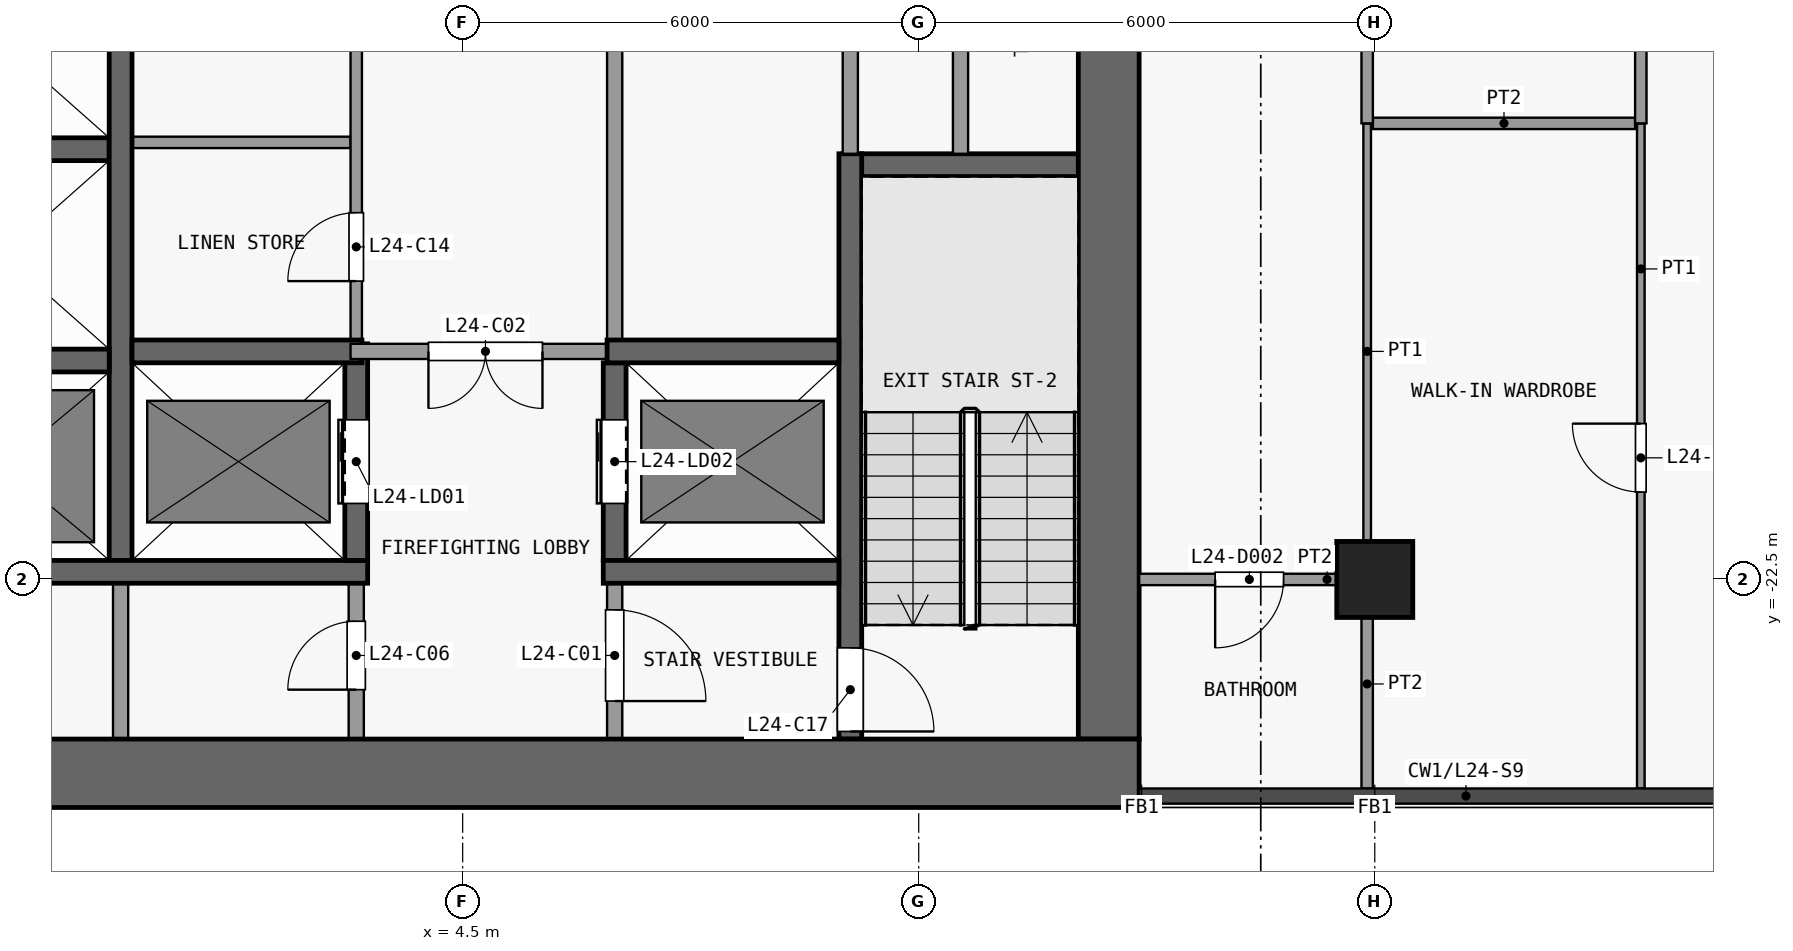
"""IFC4 building model, lengths in metres.
Left out: names, types, materials, properties, quantities, classifications, styles, units other than length and angle.
Written with IfcOpenShell. Run it as: python <this file> out.ifc"""

import sys

from ifc_helpers import new_model, si_unit, direction, frame, frame_2d, origin, origin_2d, place, context, subcontext, project, spatial, rectangle, extrude, element, fill, save


model = new_model("IFC4")
c1 = context("Model", 3, precision=1e-05, world=origin(), true_north=direction((0.0, 1.0)))
c2 = subcontext(c1, "Body", "Model", "MODEL_VIEW")
j1 = project(units=[si_unit("LENGTHUNIT", "METRE"), si_unit("PLANEANGLEUNIT", "RADIAN")], contexts=[c1])
p1 = place(None, origin())
s1 = spatial("IfcSite", under=j1, at=p1, CompositionType="ELEMENT")
p2 = place(p1, origin())
s2 = spatial("IfcBuilding", under=s1, at=p2, CompositionType="ELEMENT")
p3 = place(p2, frame((0.0, 0.0, 99.1)))
s3 = spatial("IfcBuildingStorey", under=s2, at=p3, CompositionType="ELEMENT", Elevation=99.1)
p4 = place(p3, frame((16.5, -22.5, 0.0), z_axis=(0.0, 0.0, 1.0), x_axis=(1.0, 0.0, 0.0)))
e1 = element("IfcColumn", 1, at=p4, inside=s3, PredefinedType="COLUMN", context=c2, shape_type="SweptSolid", body=[
    extrude(rectangle(XDim=1.0, YDim=1.0, at=origin_2d()), origin(), (0.0, 0.0, 1.0), 3.6),
])
p5 = place(p3, frame((-13.4, -25.05, 0.0), z_axis=(0.0, 0.0, 1.0), x_axis=(1.0, 0.0, 0.0)))
e2 = element("IfcWall", 2, at=p5, inside=s3, PredefinedType="SHEAR", context=c2, shape_type="SweptSolid", body=[
    extrude(rectangle(XDim=26.8, YDim=0.9, at=frame_2d((13.4, 0.0))), origin(), (0.0, 0.0, 1.0), 3.3),
])
p6 = place(p3, frame((13.0, -24.6, 0.0), z_axis=(0.0, 0.0, 1.0), x_axis=(0.0, 1.0, 0.0)))
e3 = element("IfcWall", 3, at=p6, inside=s3, PredefinedType="SHEAR", context=c2, shape_type="SweptSolid", body=[
    extrude(rectangle(XDim=16.1, YDim=0.8, at=frame_2d((8.05, 0.0))), origin(), (0.0, 0.0, 1.0), 3.3),
])
p7 = place(p3, frame((-2.95, -22.4, 0.0), z_axis=(0.0, 0.0, 1.0), x_axis=(1.0, 0.0, 0.0)))
e4 = element("IfcWall", 4, at=p7, inside=s3, PredefinedType="SHEAR", context=c2, shape_type="SweptSolid", body=[
    extrude(rectangle(XDim=6.2, YDim=0.3, at=frame_2d((3.1, 0.0))), origin(), (0.0, 0.0, 1.0), 3.3),
])
p8 = place(p3, frame((6.35, -22.4, 0.0), z_axis=(0.0, 0.0, 1.0), x_axis=(1.0, 0.0, 0.0)))
e5 = element("IfcWall", 5, at=p8, inside=s3, PredefinedType="SHEAR", context=c2, shape_type="SweptSolid", body=[
    extrude(rectangle(XDim=3.1, YDim=0.3, at=frame_2d((1.55, 0.0))), origin(), (0.0, 0.0, 1.0), 3.3),
])
p9 = place(p3, frame((-2.95, -19.62, 0.0), z_axis=(0.0, 0.0, 1.0), x_axis=(1.0, 0.0, 0.0)))
e6 = element("IfcWall", 6, at=p9, inside=s3, PredefinedType="SHEAR", context=c2, shape_type="SweptSolid", body=[
    extrude(rectangle(XDim=2.8, YDim=0.3, at=frame_2d((1.4, 0.0))), origin(), (0.0, 0.0, 1.0), 3.3),
])
p10 = place(p3, frame((0.15, -19.5, 0.0), z_axis=(0.0, 0.0, 1.0), x_axis=(1.0, 0.0, 0.0)))
e7 = element("IfcWall", 7, at=p10, inside=s3, PredefinedType="SHEAR", context=c2, shape_type="SweptSolid", body=[
    extrude(rectangle(XDim=3.025, YDim=0.3, at=frame_2d((1.513, 0.0))), origin(), (0.0, 0.0, 1.0), 3.3),
])
p11 = place(p3, frame((6.4, -19.5, 0.0), z_axis=(0.0, 0.0, 1.0), x_axis=(-1.0, 0.0, 0.0)))
e8 = element("IfcWall", 8, at=p11, inside=s3, PredefinedType="PARTITIONING", context=c2, shape_type="SweptSolid", body=[
    extrude(rectangle(XDim=3.375, YDim=0.2, at=frame_2d((1.688, 0.0))), origin(), (0.0, 0.0, 1.0), 3.3),
])
p12 = place(p11, frame((0.85, 0.0, 0.0)))
e9 = element("IfcOpeningElement", 9, at=p12, cuts=e8, PredefinedType="OPENING", context=c2, shape_type="SweptSolid", body=[
    extrude(rectangle(XDim=1.5, YDim=2.1, at=frame_2d((0.75, 1.05))), frame((0.0, 0.11, 0.0), z_axis=(0.0, -1.0, 0.0), x_axis=(1.0, 0.0, 0.0)), (0.0, 0.0, 1.0), 0.22),
])
p13 = place(p3, frame((6.4, -19.5, 0.0), z_axis=(0.0, 0.0, 1.0), x_axis=(1.0, 0.0, 0.0)))
e10 = element("IfcWall", 10, at=p13, inside=s3, PredefinedType="SHEAR", context=c2, shape_type="SweptSolid", body=[
    extrude(rectangle(XDim=3.05, YDim=0.3, at=frame_2d((1.525, 0.0))), origin(), (0.0, 0.0, 1.0), 3.3),
])
p14 = place(p3, frame((9.5, -17.05, 0.0), z_axis=(0.0, 0.0, 1.0), x_axis=(1.0, 0.0, 0.0)))
e11 = element("IfcWall", 11, at=p14, inside=s3, PredefinedType="SHEAR", context=c2, shape_type="SweptSolid", body=[
    extrude(rectangle(XDim=3.1, YDim=0.3, at=frame_2d((1.55, 0.0))), origin(), (0.0, 0.0, 1.0), 3.3),
])
p15 = place(p3, frame((-2.95, -16.84, 0.0), z_axis=(0.0, 0.0, 1.0), x_axis=(1.0, 0.0, 0.0)))
e12 = element("IfcWall", 12, at=p15, inside=s3, PredefinedType="SHEAR", context=c2, shape_type="SweptSolid", body=[
    extrude(rectangle(XDim=2.8, YDim=0.3, at=frame_2d((1.4, 0.0))), origin(), (0.0, 0.0, 1.0), 3.3),
])
p16 = place(p3, frame((0.15, -16.75, 0.0), z_axis=(0.0, 0.0, 1.0), x_axis=(1.0, 0.0, 0.0)))
e13 = element("IfcWall", 13, at=p16, inside=s3, PredefinedType="PARTITIONING", context=c2, shape_type="SweptSolid", body=[
    extrude(rectangle(XDim=2.875, YDim=0.15, at=frame_2d((1.438, 0.0))), origin(), (0.0, 0.0, 1.0), 3.3),
])
p17 = place(p3, frame((0.0, -24.6, 0.0), z_axis=(0.0, 0.0, 1.0), x_axis=(0.0, 1.0, 0.0)))
e14 = element("IfcWall", 14, at=p17, inside=s3, PredefinedType="PARTITIONING", context=c2, shape_type="SweptSolid", body=[
    extrude(rectangle(XDim=2.05, YDim=0.2, at=frame_2d((1.025, 0.0))), origin(), (0.0, 0.0, 1.0), 3.3),
])
p18 = place(p3, frame((0.0, -22.25, 0.0), z_axis=(0.0, 0.0, 1.0), x_axis=(0.0, 1.0, 0.0)))
e15 = element("IfcWall", 15, at=p18, inside=s3, PredefinedType="SHEAR", context=c2, shape_type="SweptSolid", body=[
    extrude(rectangle(XDim=13.75, YDim=0.3, at=frame_2d((6.875, 0.0))), origin(), (0.0, 0.0, 1.0), 3.3),
])
p19 = place(p3, frame((3.1, -24.6, 0.0), z_axis=(0.0, 0.0, 1.0), x_axis=(0.0, 1.0, 0.0)))
e16 = element("IfcWall", 16, at=p19, inside=s3, PredefinedType="PARTITIONING", context=c2, shape_type="SweptSolid", body=[
    extrude(rectangle(XDim=2.05, YDim=0.2, at=frame_2d((1.025, 0.0))), origin(), (0.0, 0.0, 1.0), 3.3),
])
p20 = place(p19, frame((0.65, 0.0, 0.0)))
e17 = element("IfcOpeningElement", 17, at=p20, cuts=e16, PredefinedType="OPENING", context=c2, shape_type="SweptSolid", body=[
    extrude(rectangle(XDim=0.9, YDim=2.1, at=frame_2d((0.45, 1.05))), frame((0.0, 0.11, 0.0), z_axis=(0.0, -1.0, 0.0), x_axis=(1.0, 0.0, 0.0)), (0.0, 0.0, 1.0), 0.22),
])
p21 = place(p3, frame((3.1, -22.25, 0.0), z_axis=(0.0, 0.0, 1.0), x_axis=(0.0, 1.0, 0.0)))
e18 = element("IfcWall", 18, at=p21, inside=s3, PredefinedType="SHEAR", context=c2, shape_type="SweptSolid", body=[
    extrude(rectangle(XDim=2.85, YDim=0.3, at=frame_2d((1.425, 0.0))), origin(), (0.0, 0.0, 1.0), 3.3),
])
p22 = place(p21, frame((0.75, 0.0, 0.0)))
e19 = element("IfcOpeningElement", 19, at=p22, cuts=e18, PredefinedType="OPENING", context=c2, shape_type="SweptSolid", body=[
    extrude(rectangle(XDim=1.1, YDim=2.1, at=frame_2d((0.55, 1.05))), frame((0.0, 0.16, 0.0), z_axis=(0.0, -1.0, 0.0), x_axis=(1.0, 0.0, 0.0)), (0.0, 0.0, 1.0), 0.32),
])
p23 = place(p3, frame((3.1, -19.4, 0.0), z_axis=(0.0, 0.0, 1.0), x_axis=(0.0, 1.0, 0.0)))
e20 = element("IfcWall", 20, at=p23, inside=s3, PredefinedType="PARTITIONING", context=c2, shape_type="SweptSolid", body=[
    extrude(rectangle(XDim=10.9, YDim=0.15, at=frame_2d((5.45, 0.0))), origin(), (0.0, 0.0, 1.0), 3.3),
])
p24 = place(p23, frame((0.825, 0.0, 0.0)))
e21 = element("IfcOpeningElement", 21, at=p24, cuts=e20, PredefinedType="OPENING", context=c2, shape_type="SweptSolid", body=[
    extrude(rectangle(XDim=0.9, YDim=2.1, at=frame_2d((0.45, 1.05))), frame((0.0, 0.085, 0.0), z_axis=(0.0, -1.0, 0.0), x_axis=(1.0, 0.0, 0.0)), (0.0, 0.0, 1.0), 0.17),
])
p25 = place(p23, frame((6.175, 0.0, 0.0)))
e22 = element("IfcOpeningElement", 22, at=p25, cuts=e20, PredefinedType="OPENING", context=c2, shape_type="SweptSolid", body=[
    extrude(rectangle(XDim=1.2, YDim=2.1, at=frame_2d((0.6, 1.05))), frame((0.0, 0.085, 0.0), z_axis=(0.0, -1.0, 0.0), x_axis=(1.0, 0.0, 0.0)), (0.0, 0.0, 1.0), 0.17),
])
p26 = place(p3, frame((6.5, -22.55, 0.0), z_axis=(0.0, 0.0, 1.0), x_axis=(0.0, -1.0, 0.0)))
e23 = element("IfcWall", 23, at=p26, inside=s3, PredefinedType="PARTITIONING", context=c2, shape_type="SweptSolid", body=[
    extrude(rectangle(XDim=2.05, YDim=0.2, at=frame_2d((1.025, 0.0))), origin(), (0.0, 0.0, 1.0), 3.3),
])
p27 = place(p26, frame((0.35, 0.0, 0.0)))
e24 = element("IfcOpeningElement", 24, at=p27, cuts=e23, PredefinedType="OPENING", context=c2, shape_type="SweptSolid", body=[
    extrude(rectangle(XDim=1.2, YDim=2.1, at=frame_2d((0.6, 1.05))), frame((0.0, 0.11, 0.0), z_axis=(0.0, -1.0, 0.0), x_axis=(1.0, 0.0, 0.0)), (0.0, 0.0, 1.0), 0.22),
])
p28 = place(p3, frame((6.5, -22.25, 0.0), z_axis=(0.0, 0.0, 1.0), x_axis=(0.0, 1.0, 0.0)))
e25 = element("IfcWall", 25, at=p28, inside=s3, PredefinedType="SHEAR", context=c2, shape_type="SweptSolid", body=[
    extrude(rectangle(XDim=2.6, YDim=0.3, at=frame_2d((1.3, 0.0))), origin(), (0.0, 0.0, 1.0), 3.3),
])
p29 = place(p28, frame((0.75, 0.0, 0.0)))
e26 = element("IfcOpeningElement", 26, at=p29, cuts=e25, PredefinedType="OPENING", context=c2, shape_type="SweptSolid", body=[
    extrude(rectangle(XDim=1.1, YDim=2.1, at=frame_2d((0.55, 1.05))), frame((0.0, 0.16, 0.0), z_axis=(0.0, -1.0, 0.0), x_axis=(1.0, 0.0, 0.0)), (0.0, 0.0, 1.0), 0.32),
])
p30 = place(p3, frame((6.5, -8.5, 0.0), z_axis=(0.0, 0.0, 1.0), x_axis=(0.0, -1.0, 0.0)))
e27 = element("IfcWall", 27, at=p30, inside=s3, PredefinedType="PARTITIONING", context=c2, shape_type="SweptSolid", body=[
    extrude(rectangle(XDim=10.85, YDim=0.2, at=frame_2d((5.425, 0.0))), origin(), (0.0, 0.0, 1.0), 3.3),
])
p31 = place(p30, frame((4.9, 0.0, 0.0)))
e28 = element("IfcOpeningElement", 28, at=p31, cuts=e27, PredefinedType="OPENING", context=c2, shape_type="SweptSolid", body=[
    extrude(rectangle(XDim=1.2, YDim=2.1, at=frame_2d((0.6, 1.05))), frame((0.0, 0.11, 0.0), z_axis=(0.0, -1.0, 0.0), x_axis=(1.0, 0.0, 0.0)), (0.0, 0.0, 1.0), 0.22),
])
p32 = place(p3, frame((9.6, -16.9, 0.0), z_axis=(0.0, 0.0, 1.0), x_axis=(0.0, -1.0, 0.0)))
e29 = element("IfcWall", 29, at=p32, inside=s3, PredefinedType="SHEAR", context=c2, shape_type="SweptSolid", body=[
    extrude(rectangle(XDim=7.7, YDim=0.3, at=frame_2d((3.85, 0.0))), origin(), (0.0, 0.0, 1.0), 3.3),
])
p33 = place(p32, frame((6.5, 0.0, 0.0)))
e30 = element("IfcOpeningElement", 30, at=p33, cuts=e29, PredefinedType="OPENING", context=c2, shape_type="SweptSolid", body=[
    extrude(rectangle(XDim=1.1, YDim=2.1, at=frame_2d((0.55, 1.05))), frame((0.0, 0.16, 0.0), z_axis=(0.0, -1.0, 0.0), x_axis=(1.0, 0.0, 0.0)), (0.0, 0.0, 1.0), 0.32),
])
p34 = place(p3, frame((9.6, -16.9, 0.0), z_axis=(0.0, 0.0, 1.0), x_axis=(0.0, 1.0, 0.0)))
e31 = element("IfcWall", 31, at=p34, inside=s3, PredefinedType="PARTITIONING", context=c2, shape_type="SweptSolid", body=[
    extrude(rectangle(XDim=8.4, YDim=0.2, at=frame_2d((4.2, 0.0))), origin(), (0.0, 0.0, 1.0), 3.3),
])
p35 = place(p3, frame((11.05, -10.5, 0.0), z_axis=(0.0, 0.0, 1.0), x_axis=(0.0, -1.0, 0.0)))
e32 = element("IfcWall", 32, at=p35, inside=s3, PredefinedType="PARTITIONING", context=c2, shape_type="SweptSolid", body=[
    extrude(rectangle(XDim=6.4, YDim=0.2, at=frame_2d((3.2, 0.0))), origin(), (0.0, 0.0, 1.0), 3.3),
])
p36 = place(p35, frame((2.875, 0.0, 0.0)))
e33 = element("IfcOpeningElement", 33, at=p36, cuts=e32, PredefinedType="OPENING", context=c2, shape_type="SweptSolid", body=[
    extrude(rectangle(XDim=0.9, YDim=2.1, at=frame_2d((0.45, 1.05))), frame((0.0, 0.11, 0.0), z_axis=(0.0, -1.0, 0.0), x_axis=(1.0, 0.0, 0.0)), (0.0, 0.0, 1.0), 0.22),
])
p37 = place(p3, frame((13.4, -22.5, 0.0), z_axis=(0.0, 0.0, 1.0), x_axis=(1.0, 0.0, 0.0)))
e34 = element("IfcWall", 34, at=p37, inside=s3, PredefinedType="PARTITIONING", context=c2, shape_type="SweptSolid", body=[
    extrude(rectangle(XDim=2.925, YDim=0.15, at=frame_2d((1.462, 0.0))), origin(), (0.0, 0.0, 1.0), 3.3),
])
p38 = place(p37, frame((1.0, 0.0, 0.0)))
e35 = element("IfcOpeningElement", 35, at=p38, cuts=e34, PredefinedType="OPENING", context=c2, shape_type="SweptSolid", body=[
    extrude(rectangle(XDim=0.9, YDim=2.1, at=frame_2d((0.45, 1.05))), frame((0.0, 0.085, 0.0), z_axis=(0.0, -1.0, 0.0), x_axis=(1.0, 0.0, 0.0)), (0.0, 0.0, 1.0), 0.17),
])
p39 = place(p3, frame((16.475, -16.5, 0.0), z_axis=(0.0, 0.0, 1.0), x_axis=(1.0, 0.0, 0.0)))
e36 = element("IfcWall", 36, at=p39, inside=s3, PredefinedType="PARTITIONING", context=c2, shape_type="SweptSolid", body=[
    extrude(rectangle(XDim=3.45, YDim=0.15, at=frame_2d((1.725, 0.0))), origin(), (0.0, 0.0, 1.0), 3.3),
])
p40 = place(p3, frame((16.4, -22.5, 0.0), z_axis=(0.0, 0.0, 1.0), x_axis=(0.0, 1.0, 0.0)))
e37 = element("IfcWall", 37, at=p40, inside=s3, PredefinedType="PARTITIONING", context=c2, shape_type="SweptSolid", body=[
    extrude(rectangle(XDim=6.0, YDim=0.1, at=frame_2d((3.0, 0.0))), origin(), (0.0, 0.0, 1.0), 3.3),
])
p41 = place(p3, frame((16.4, -25.25, 0.0), z_axis=(0.0, 0.0, 1.0), x_axis=(0.0, 1.0, 0.0)))
e38 = element("IfcWall", 38, at=p41, inside=s3, PredefinedType="PARTITIONING", context=c2, shape_type="SweptSolid", body=[
    extrude(rectangle(XDim=2.75, YDim=0.15, at=frame_2d((1.375, 0.0))), origin(), (0.0, 0.0, 1.0), 3.3),
])
p42 = place(p3, frame((16.4, -16.5, 0.0), z_axis=(0.0, 0.0, 1.0), x_axis=(0.0, 1.0, 0.0)))
e39 = element("IfcWall", 39, at=p42, inside=s3, PredefinedType="PARTITIONING", context=c2, shape_type="SweptSolid", body=[
    extrude(rectangle(XDim=8.5, YDim=0.15, at=frame_2d((4.25, 0.0))), origin(), (0.0, 0.0, 1.0), 3.3),
])
p43 = place(p42, frame((5.3, 0.0, 0.0)))
e40 = element("IfcOpeningElement", 40, at=p43, cuts=e39, PredefinedType="OPENING", context=c2, shape_type="SweptSolid", body=[
    extrude(rectangle(XDim=0.9, YDim=2.1, at=frame_2d((0.45, 1.05))), frame((0.0, 0.085, 0.0), z_axis=(0.0, -1.0, 0.0), x_axis=(1.0, 0.0, 0.0)), (0.0, 0.0, 1.0), 0.17),
])
p44 = place(p3, frame((20.0, -25.25, 0.0), z_axis=(0.0, 0.0, 1.0), x_axis=(0.0, 1.0, 0.0)))
e41 = element("IfcWall", 41, at=p44, inside=s3, PredefinedType="PARTITIONING", context=c2, shape_type="SweptSolid", body=[
    extrude(rectangle(XDim=8.75, YDim=0.1, at=frame_2d((4.375, 0.0))), origin(), (0.0, 0.0, 1.0), 3.3),
])
p45 = place(p44, frame((3.9, 0.0, 0.0)))
e42 = element("IfcOpeningElement", 42, at=p45, cuts=e41, PredefinedType="OPENING", context=c2, shape_type="SweptSolid", body=[
    extrude(rectangle(XDim=0.9, YDim=2.1, at=frame_2d((0.45, 1.05))), frame((0.0, 0.06, 0.0), z_axis=(0.0, -1.0, 0.0), x_axis=(1.0, 0.0, 0.0)), (0.0, 0.0, 1.0), 0.12),
])
p46 = place(p3, frame((20.0, -16.5, 0.0), z_axis=(0.0, 0.0, 1.0), x_axis=(0.0, 1.0, 0.0)))
e43 = element("IfcWall", 43, at=p46, inside=s3, PredefinedType="PARTITIONING", context=c2, shape_type="SweptSolid", body=[
    extrude(rectangle(XDim=2.925, YDim=0.15, at=frame_2d((1.462, 0.0))), origin(), (0.0, 0.0, 1.0), 3.3),
])
p47 = place(p46, frame((1.0, 0.0, 0.0)))
e44 = element("IfcOpeningElement", 44, at=p47, cuts=e43, PredefinedType="OPENING", context=c2, shape_type="SweptSolid", body=[
    extrude(rectangle(XDim=0.9, YDim=2.1, at=frame_2d((0.45, 1.05))), frame((0.0, 0.085, 0.0), z_axis=(0.0, -1.0, 0.0), x_axis=(1.0, 0.0, 0.0)), (0.0, 0.0, 1.0), 0.17),
])
p48 = place(p22, origin())
e45 = element("IfcDoor", 45, at=p48, inside=s3, OperationType="DOUBLE_DOOR_SLIDING", PredefinedType="DOOR", context=c2, shape_type="SweptSolid", body=[
    extrude(rectangle(XDim=1.1, YDim=2.1, at=frame_2d((0.55, 1.05))), frame((0.0, 0.025, 0.0), z_axis=(0.0, -1.0, 0.0), x_axis=(1.0, 0.0, 0.0)), (0.0, 0.0, 1.0), 0.05),
])
fill(e19, e45)
p49 = place(p29, origin())
e46 = element("IfcDoor", 46, at=p49, inside=s3, OperationType="DOUBLE_DOOR_SLIDING", PredefinedType="DOOR", context=c2, shape_type="SweptSolid", body=[
    extrude(rectangle(XDim=1.1, YDim=2.1, at=frame_2d((0.55, 1.05))), frame((0.0, 0.025, 0.0), z_axis=(0.0, -1.0, 0.0), x_axis=(1.0, 0.0, 0.0)), (0.0, 0.0, 1.0), 0.05),
])
fill(e26, e46)
p50 = place(p27, origin())
e47 = element("IfcDoor", 47, at=p50, inside=s3, OperationType="SINGLE_SWING_RIGHT", PredefinedType="DOOR", context=c2, shape_type="SweptSolid", body=[
    extrude(rectangle(XDim=1.2, YDim=2.1, at=frame_2d((0.6, 1.05))), frame((0.0, 0.025, 0.0), z_axis=(0.0, -1.0, 0.0), x_axis=(1.0, 0.0, 0.0)), (0.0, 0.0, 1.0), 0.05),
])
fill(e24, e47)
p51 = place(p12, origin())
e48 = element("IfcDoor", 48, at=p51, inside=s3, OperationType="DOUBLE_DOOR_SINGLE_SWING", PredefinedType="DOOR", context=c2, shape_type="SweptSolid", body=[
    extrude(rectangle(XDim=1.5, YDim=2.1, at=frame_2d((0.75, 1.05))), frame((0.0, 0.025, 0.0), z_axis=(0.0, -1.0, 0.0), x_axis=(1.0, 0.0, 0.0)), (0.0, 0.0, 1.0), 0.05),
])
fill(e9, e48)
p52 = place(p20, origin())
e49 = element("IfcDoor", 49, at=p52, inside=s3, OperationType="SINGLE_SWING_LEFT", PredefinedType="DOOR", context=c2, shape_type="SweptSolid", body=[
    extrude(rectangle(XDim=0.9, YDim=2.1, at=frame_2d((0.45, 1.05))), frame((0.0, 0.025, 0.0), z_axis=(0.0, -1.0, 0.0), x_axis=(1.0, 0.0, 0.0)), (0.0, 0.0, 1.0), 0.05),
])
fill(e17, e49)
p53 = place(p24, origin())
e50 = element("IfcDoor", 50, at=p53, inside=s3, OperationType="SINGLE_SWING_LEFT", PredefinedType="DOOR", context=c2, shape_type="SweptSolid", body=[
    extrude(rectangle(XDim=0.9, YDim=2.1, at=frame_2d((0.45, 1.05))), frame((0.0, 0.025, 0.0), z_axis=(0.0, -1.0, 0.0), x_axis=(1.0, 0.0, 0.0)), (0.0, 0.0, 1.0), 0.05),
])
fill(e21, e50)
p54 = place(p33, origin())
e51 = element("IfcDoor", 51, at=p54, inside=s3, OperationType="SINGLE_SWING_RIGHT", PredefinedType="DOOR", context=c2, shape_type="SweptSolid", body=[
    extrude(rectangle(XDim=1.1, YDim=2.1, at=frame_2d((0.55, 1.05))), frame((0.0, 0.025, 0.0), z_axis=(0.0, -1.0, 0.0), x_axis=(1.0, 0.0, 0.0)), (0.0, 0.0, 1.0), 0.05),
])
fill(e30, e51)
p55 = place(p38, origin())
e52 = element("IfcDoor", 52, at=p55, inside=s3, OperationType="SINGLE_SWING_LEFT", PredefinedType="DOOR", context=c2, shape_type="SweptSolid", body=[
    extrude(rectangle(XDim=0.9, YDim=2.1, at=frame_2d((0.45, 1.05))), frame((0.0, 0.025, 0.0), z_axis=(0.0, -1.0, 0.0), x_axis=(1.0, 0.0, 0.0)), (0.0, 0.0, 1.0), 0.05),
])
fill(e35, e52)
p56 = place(p45, origin())
e53 = element("IfcDoor", 53, at=p56, inside=s3, OperationType="SINGLE_SWING_LEFT", PredefinedType="DOOR", context=c2, shape_type="SweptSolid", body=[
    extrude(rectangle(XDim=0.9, YDim=2.1, at=frame_2d((0.45, 1.05))), frame((0.0, 0.025, 0.0), z_axis=(0.0, -1.0, 0.0), x_axis=(1.0, 0.0, 0.0)), (0.0, 0.0, 1.0), 0.05),
])
fill(e42, e53)
save(model, sys.argv[1])
